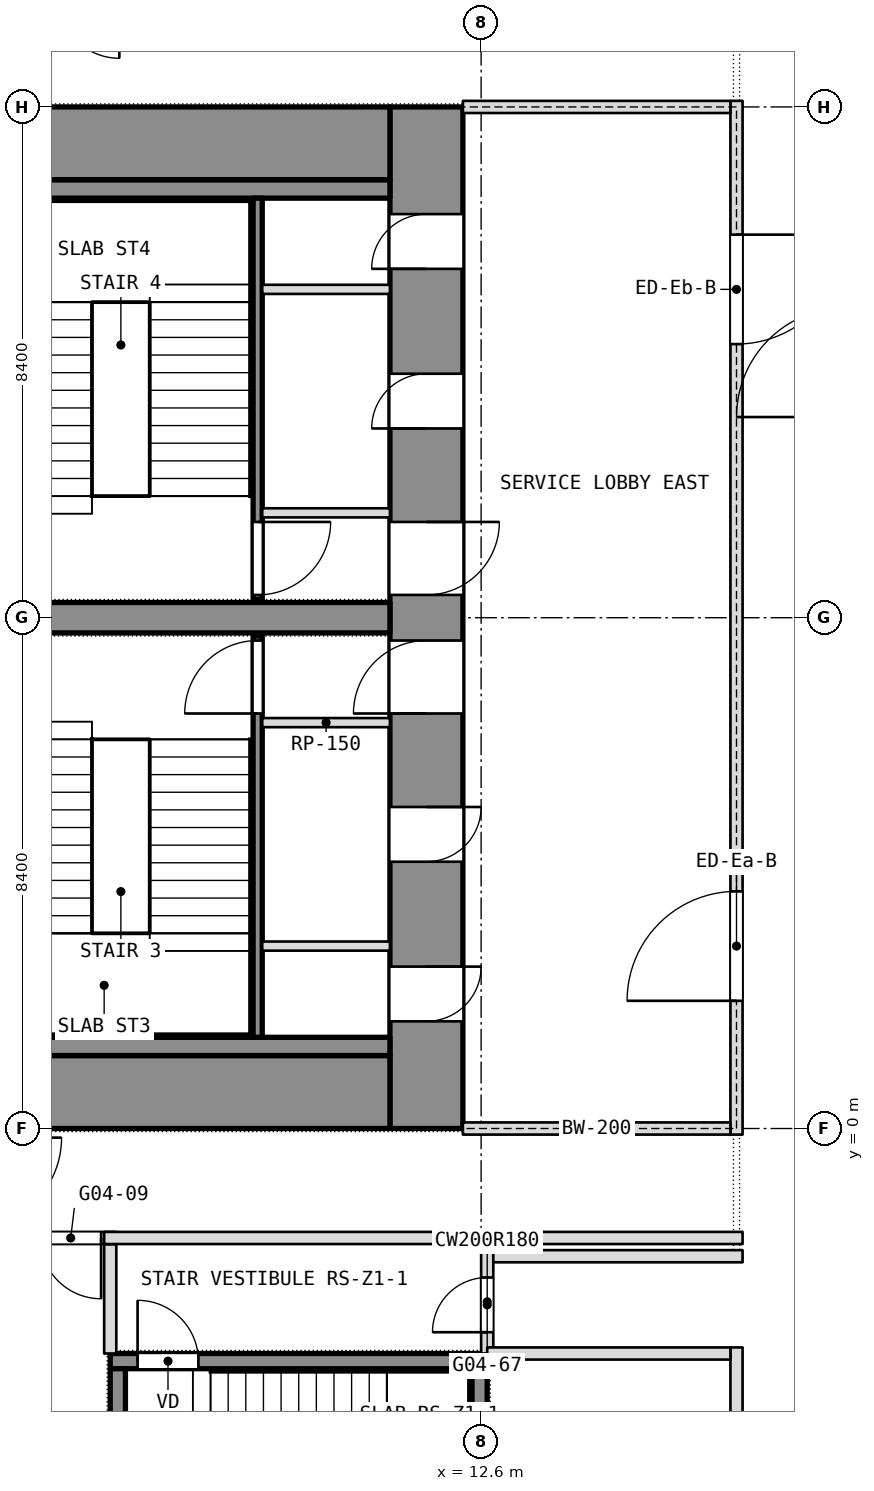
"""IFC4 building model, lengths in metres.
Left out: names, types, materials, properties, quantities, classifications, styles, units other than length and angle.
Written with IfcOpenShell. Run it as: python <this file> out.ifc"""

import sys

from ifc_helpers import new_model, si_unit, direction, frame, frame_2d, origin, place, context, subcontext, project, spatial, rectangle, extrude, element, fill, save


model = new_model("IFC4")
c1 = context("Model", 3, precision=1e-05, world=origin(), true_north=direction((0.0, 1.0)))
c2 = subcontext(c1, "Body", "Model", "MODEL_VIEW")
j1 = project(units=[si_unit("LENGTHUNIT", "METRE"), si_unit("PLANEANGLEUNIT", "RADIAN")], contexts=[c1])
p1 = place(None, origin())
s1 = spatial("IfcSite", under=j1, at=p1, CompositionType="ELEMENT")
p2 = place(p1, origin())
s2 = spatial("IfcBuilding", under=s1, at=p2, CompositionType="ELEMENT")
p3 = place(p2, frame((0.0, 0.0, 58.1)))
s3 = spatial("IfcBuildingStorey", under=s2, at=p3, CompositionType="ELEMENT", Elevation=58.1)
p4 = place(p3, frame((11.7, 0.0, 0.0), z_axis=(0.0, 0.0, 1.0), x_axis=(0.0, 1.0, 0.0)))
e1 = element("IfcWall", 1, at=p4, inside=s3, PredefinedType="SHEAR", context=c2, shape_type="SweptSolid", body=[
    extrude(rectangle(XDim=16.8, YDim=1.2, at=frame_2d((8.4, 0.0))), origin(), (0.0, 0.0, 1.0), 3.6),
])
p5 = place(p4, frame((1.762, 0.0, 0.0)))
e2 = element("IfcOpeningElement", 2, at=p5, cuts=e1, PredefinedType="OPENING", context=c2, shape_type="SweptSolid", body=[
    extrude(rectangle(XDim=0.9, YDim=2.1, at=frame_2d((0.45, 1.05))), frame((0.0, 0.6, 0.0), z_axis=(0.0, -1.0, 0.0), x_axis=(1.0, 0.0, 0.0)), (0.0, 0.0, 1.0), 1.2),
])
p6 = place(p4, frame((4.387, 0.0, 0.0)))
e3 = element("IfcOpeningElement", 3, at=p6, cuts=e1, PredefinedType="OPENING", context=c2, shape_type="SweptSolid", body=[
    extrude(rectangle(XDim=0.9, YDim=2.1, at=frame_2d((0.45, 1.05))), frame((0.0, 0.6, 0.0), z_axis=(0.0, -1.0, 0.0), x_axis=(1.0, 0.0, 0.0)), (0.0, 0.0, 1.0), 1.2),
])
p7 = place(p4, frame((6.825, 0.0, 0.0)))
e4 = element("IfcOpeningElement", 4, at=p7, cuts=e1, PredefinedType="OPENING", context=c2, shape_type="SweptSolid", body=[
    extrude(rectangle(XDim=1.2, YDim=2.1, at=frame_2d((0.6, 1.05))), frame((0.0, 0.6, 0.0), z_axis=(0.0, -1.0, 0.0), x_axis=(1.0, 0.0, 0.0)), (0.0, 0.0, 1.0), 1.2),
])
p8 = place(p4, frame((14.137, 0.0, 0.0)))
e5 = element("IfcOpeningElement", 5, at=p8, cuts=e1, PredefinedType="OPENING", context=c2, shape_type="SweptSolid", body=[
    extrude(rectangle(XDim=0.9, YDim=2.1, at=frame_2d((0.45, 1.05))), frame((0.0, 0.6, 0.0), z_axis=(0.0, -1.0, 0.0), x_axis=(1.0, 0.0, 0.0)), (0.0, 0.0, 1.0), 1.2),
])
p9 = place(p4, frame((11.512, 0.0, 0.0)))
e6 = element("IfcOpeningElement", 6, at=p9, cuts=e1, PredefinedType="OPENING", context=c2, shape_type="SweptSolid", body=[
    extrude(rectangle(XDim=0.9, YDim=2.1, at=frame_2d((0.45, 1.05))), frame((0.0, 0.6, 0.0), z_axis=(0.0, -1.0, 0.0), x_axis=(1.0, 0.0, 0.0)), (0.0, 0.0, 1.0), 1.2),
])
p10 = place(p4, frame((8.775, 0.0, 0.0)))
e7 = element("IfcOpeningElement", 7, at=p10, cuts=e1, PredefinedType="OPENING", context=c2, shape_type="SweptSolid", body=[
    extrude(rectangle(XDim=1.2, YDim=2.1, at=frame_2d((0.6, 1.05))), frame((0.0, 0.6, 0.0), z_axis=(0.0, -1.0, 0.0), x_axis=(1.0, 0.0, 0.0)), (0.0, 0.0, 1.0), 1.2),
])
for number, where, z_axis, x_axis in (
    (8, (-11.1, 0.6, 0.0), (0.0, 0.0, 1.0), (1.0, 0.0, 0.0)),
    (9, (-11.1, 16.2, 0.0), (0.0, 0.0, 1.0), (1.0, 0.0, 0.0)),
):
    element("IfcWall", number, at=place(p3, frame(where, z_axis=z_axis, x_axis=x_axis)), inside=s3, PredefinedType="SHEAR", context=c2, shape_type="SweptSolid", body=[
        extrude(rectangle(XDim=22.2, YDim=1.2, at=frame_2d((11.1, 0.0))), origin(), (0.0, 0.0, 1.0), 3.6),
    ])
p11 = place(p3, frame((4.45, 8.4, 0.0), z_axis=(0.0, 0.0, 1.0), x_axis=(1.0, 0.0, 0.0)))
e10 = element("IfcWall", 10, at=p11, inside=s3, PredefinedType="SHEAR", context=c2, shape_type="SweptSolid", body=[
    extrude(rectangle(XDim=6.65, YDim=0.5, at=frame_2d((3.325, 0.0))), origin(), (0.0, 0.0, 1.0), 3.6),
])
p12 = place(p3, frame((16.8, -10.9, 0.0), z_axis=(0.0, 0.0, 1.0), x_axis=(0.0, 1.0, 0.0)))
e11 = element("IfcWall", 11, at=p12, inside=s3, PredefinedType="PARTITIONING", context=c2, shape_type="SweptSolid", body=[
    extrude(rectangle(XDim=7.3, YDim=0.2, at=frame_2d((3.65, 0.0))), origin(), (0.0, 0.0, 1.0), 3.34),
])
p13 = place(p12, frame((3.15, 0.0, 0.0)))
e12 = element("IfcOpeningElement", 12, at=p13, cuts=e11, PredefinedType="OPENING", context=c2, shape_type="SweptSolid", body=[
    extrude(rectangle(XDim=1.0, YDim=2.1, at=frame_2d((0.5, 1.05))), frame((0.0, 0.1, 0.0), z_axis=(0.0, -1.0, 0.0), x_axis=(1.0, 0.0, 0.0)), (0.0, 0.0, 1.0), 0.2),
])
p14 = place(p3, frame((12.7, -3.7, 0.0), z_axis=(0.0, 0.0, 1.0), x_axis=(0.0, 1.0, 0.0)))
e13 = element("IfcWall", 13, at=p14, inside=s3, PredefinedType="PARTITIONING", context=c2, shape_type="SweptSolid", body=[
    extrude(rectangle(XDim=1.7, YDim=0.2, at=frame_2d((0.85, 0.0))), origin(), (0.0, 0.0, 1.0), 3.34),
])
p15 = place(p14, frame((0.35, 0.0, 0.0)))
e14 = element("IfcOpeningElement", 14, at=p15, cuts=e13, PredefinedType="OPENING", context=c2, shape_type="SweptSolid", body=[
    extrude(rectangle(XDim=0.9, YDim=2.1, at=frame_2d((0.45, 1.05))), frame((0.0, 0.1, 0.0), z_axis=(0.0, -1.0, 0.0), x_axis=(1.0, 0.0, 0.0)), (0.0, 0.0, 1.0), 0.2),
])
p16 = place(p3, frame((6.5, -3.7, 0.0), z_axis=(0.0, 0.0, 1.0), x_axis=(0.0, 1.0, 0.0)))
e15 = element("IfcWall", 15, at=p16, inside=s3, PredefinedType="PARTITIONING", context=c2, shape_type="SweptSolid", body=[
    extrude(rectangle(XDim=1.8, YDim=0.2, at=frame_2d((0.9, 0.0))), origin(), (0.0, 0.0, 1.0), 3.34),
])
p17 = place(p3, frame((12.7, -3.7, 0.0), z_axis=(0.0, 0.0, 1.0), x_axis=(1.0, 0.0, 0.0)))
e16 = element("IfcWall", 16, at=p17, inside=s3, PredefinedType="PARTITIONING", context=c2, shape_type="SweptSolid", body=[
    extrude(rectangle(XDim=4.0, YDim=0.2, at=frame_2d((2.0, 0.0))), origin(), (0.0, 0.0, 1.0), 3.34),
])
p18 = place(p3, frame((12.8, -2.1, 0.0), z_axis=(0.0, 0.0, 1.0), x_axis=(1.0, 0.0, 0.0)))
e17 = element("IfcWall", 17, at=p18, inside=s3, PredefinedType="PARTITIONING", context=c2, shape_type="SweptSolid", body=[
    extrude(rectangle(XDim=4.1, YDim=0.2, at=frame_2d((2.05, 0.0))), origin(), (0.0, 0.0, 1.0), 3.34),
])
p19 = place(p3, frame((-5.6, -1.8, 0.0), z_axis=(0.0, 0.0, 1.0), x_axis=(1.0, 0.0, 0.0)))
e18 = element("IfcWall", 18, at=p19, inside=s3, PredefinedType="PARTITIONING", context=c2, shape_type="SweptSolid", body=[
    extrude(rectangle(XDim=12.2, YDim=0.2, at=frame_2d((6.1, 0.0))), origin(), (0.0, 0.0, 1.0), 3.34),
])
p20 = place(p19, frame((0.25, 0.0, 0.0)))
e19 = element("IfcOpeningElement", 19, at=p20, cuts=e18, PredefinedType="OPENING", context=c2, shape_type="SweptSolid", body=[
    extrude(rectangle(XDim=1.0, YDim=2.1, at=frame_2d((0.5, 1.05))), frame((0.0, 0.1, 0.0), z_axis=(0.0, -1.0, 0.0), x_axis=(1.0, 0.0, 0.0)), (0.0, 0.0, 1.0), 0.2),
])
p21 = place(p19, frame((3.0, 0.0, 0.0)))
e20 = element("IfcOpeningElement", 20, at=p21, cuts=e18, PredefinedType="OPENING", context=c2, shape_type="SweptSolid", body=[
    extrude(rectangle(XDim=1.0, YDim=2.1, at=frame_2d((0.5, 1.05))), frame((0.0, 0.1, 0.0), z_axis=(0.0, -1.0, 0.0), x_axis=(1.0, 0.0, 0.0)), (0.0, 0.0, 1.0), 0.2),
])
p22 = place(p19, frame((10.95, 0.0, 0.0)))
e21 = element("IfcOpeningElement", 21, at=p22, cuts=e18, PredefinedType="OPENING", context=c2, shape_type="SweptSolid", body=[
    extrude(rectangle(XDim=1.0, YDim=2.1, at=frame_2d((0.5, 1.05))), frame((0.0, 0.1, 0.0), z_axis=(0.0, -1.0, 0.0), x_axis=(1.0, 0.0, 0.0)), (0.0, 0.0, 1.0), 0.2),
])
p23 = place(p19, frame((7.2, 0.0, 0.0)))
e22 = element("IfcOpeningElement", 22, at=p23, cuts=e18, PredefinedType="OPENING", context=c2, shape_type="SweptSolid", body=[
    extrude(rectangle(XDim=1.0, YDim=2.1, at=frame_2d((0.5, 1.05))), frame((0.0, 0.1, 0.0), z_axis=(0.0, -1.0, 0.0), x_axis=(1.0, 0.0, 0.0)), (0.0, 0.0, 1.0), 0.2),
])
p24 = place(p3, frame((6.4, -1.8, 0.0), z_axis=(0.0, 0.0, 1.0), x_axis=(1.0, 0.0, 0.0)))
e23 = element("IfcWall", 23, at=p24, inside=s3, PredefinedType="PARTITIONING", context=c2, shape_type="SweptSolid", body=[
    extrude(rectangle(XDim=10.5, YDim=0.2, at=frame_2d((5.25, 0.0))), origin(), (0.0, 0.0, 1.0), 3.34),
])
for number, where, z_axis, x_axis in (
    (24, (-11.1, 1.35, 0.0), (0.0, 0.0, 1.0), (1.0, 0.0, 0.0)),
    (25, (-11.1, 15.45, 0.0), (0.0, 0.0, 1.0), (1.0, 0.0, 0.0)),
):
    element("IfcWall", number, at=place(p3, frame(where, z_axis=z_axis, x_axis=x_axis)), inside=s3, PredefinedType="PARTITIONING", context=c2, shape_type="SweptSolid", body=[
        extrude(rectangle(XDim=22.2, YDim=0.3, at=frame_2d((11.1, 0.0))), origin(), (0.0, 0.0, 1.0), 3.34),
    ])
p25 = place(p3, frame((8.925, 1.5, 0.0), z_axis=(0.0, 0.0, 1.0), x_axis=(0.0, 1.0, 0.0)))
e26 = element("IfcWall", 26, at=p25, inside=s3, PredefinedType="SHEAR", context=c2, shape_type="SweptSolid", body=[
    extrude(rectangle(XDim=6.6, YDim=0.15, at=frame_2d((3.3, 0.0))), origin(), (0.0, 0.0, 1.0), 3.34),
])
p26 = place(p25, frame((5.325, 0.0, 0.0)))
e27 = element("IfcOpeningElement", 27, at=p26, cuts=e26, PredefinedType="OPENING", context=c2, shape_type="SweptSolid", body=[
    extrude(rectangle(XDim=1.2, YDim=2.1, at=frame_2d((0.6, 1.05))), frame((0.0, 0.075, 0.0), z_axis=(0.0, -1.0, 0.0), x_axis=(1.0, 0.0, 0.0)), (0.0, 0.0, 1.0), 0.15),
])
for number, where, z_axis, x_axis in (
    (28, (9.0, 6.675, 0.0), (0.0, 0.0, 1.0), (1.0, 0.0, 0.0)),
    (29, (9.0, 3.0, 0.0), (0.0, 0.0, 1.0), (1.0, 0.0, 0.0)),
):
    element("IfcWall", number, at=place(p3, frame(where, z_axis=z_axis, x_axis=x_axis)), inside=s3, PredefinedType="PARTITIONING", context=c2, shape_type="SweptSolid", body=[
        extrude(rectangle(XDim=2.1, YDim=0.15, at=frame_2d((1.05, 0.0))), origin(), (0.0, 0.0, 1.0), 3.34),
    ])
p27 = place(p3, frame((8.925, 8.7, 0.0), z_axis=(0.0, 0.0, 1.0), x_axis=(0.0, 1.0, 0.0)))
e30 = element("IfcWall", 30, at=p27, inside=s3, PredefinedType="SHEAR", context=c2, shape_type="SweptSolid", body=[
    extrude(rectangle(XDim=6.6, YDim=0.15, at=frame_2d((3.3, 0.0))), origin(), (0.0, 0.0, 1.0), 3.34),
])
p28 = place(p27, frame((0.075, 0.0, 0.0)))
e31 = element("IfcOpeningElement", 31, at=p28, cuts=e30, PredefinedType="OPENING", context=c2, shape_type="SweptSolid", body=[
    extrude(rectangle(XDim=1.2, YDim=2.1, at=frame_2d((0.6, 1.05))), frame((0.0, 0.075, 0.0), z_axis=(0.0, -1.0, 0.0), x_axis=(1.0, 0.0, 0.0)), (0.0, 0.0, 1.0), 0.15),
])
for number, where, z_axis, x_axis in (
    (32, (9.0, 10.125, 0.0), (0.0, 0.0, 1.0), (1.0, 0.0, 0.0)),
    (33, (9.0, 13.8, 0.0), (0.0, 0.0, 1.0), (1.0, 0.0, 0.0)),
):
    element("IfcWall", number, at=place(p3, frame(where, z_axis=z_axis, x_axis=x_axis)), inside=s3, PredefinedType="PARTITIONING", context=c2, shape_type="SweptSolid", body=[
        extrude(rectangle(XDim=2.1, YDim=0.15, at=frame_2d((1.05, 0.0))), origin(), (0.0, 0.0, 1.0), 3.34),
    ])
p29 = place(p3, frame((16.8, -0.1, 0.0), z_axis=(0.0, 0.0, 1.0), x_axis=(0.0, 1.0, 0.0)))
e34 = element("IfcWall", 34, at=p29, inside=s3, PredefinedType="PARTITIONING", context=c2, shape_type="SweptSolid", body=[
    extrude(rectangle(XDim=17.0, YDim=0.2, at=frame_2d((8.5, 0.0))), origin(), (0.0, 0.0, 1.0), 3.34),
])
p30 = place(p29, frame((2.2, 0.0, 0.0)))
e35 = element("IfcOpeningElement", 35, at=p30, cuts=e34, PredefinedType="OPENING", context=c2, shape_type="SweptSolid", body=[
    extrude(rectangle(XDim=1.8, YDim=2.1, at=frame_2d((0.9, 1.05))), frame((0.0, 0.1, 0.0), z_axis=(0.0, -1.0, 0.0), x_axis=(1.0, 0.0, 0.0)), (0.0, 0.0, 1.0), 0.2),
])
p31 = place(p29, frame((13.0, 0.0, 0.0)))
e36 = element("IfcOpeningElement", 36, at=p31, cuts=e34, PredefinedType="OPENING", context=c2, shape_type="SweptSolid", body=[
    extrude(rectangle(XDim=1.8, YDim=2.1, at=frame_2d((0.9, 1.05))), frame((0.0, 0.1, 0.0), z_axis=(0.0, -1.0, 0.0), x_axis=(1.0, 0.0, 0.0)), (0.0, 0.0, 1.0), 0.2),
])
for number, where, z_axis, x_axis in (
    (37, (12.3, 0.0, 0.0), (0.0, 0.0, 1.0), (1.0, 0.0, 0.0)),
    (38, (12.3, 16.8, 0.0), (0.0, 0.0, 1.0), (1.0, 0.0, 0.0)),
):
    element("IfcWall", number, at=place(p3, frame(where, z_axis=z_axis, x_axis=x_axis)), inside=s3, PredefinedType="PARTITIONING", context=c2, shape_type="SweptSolid", body=[
        extrude(rectangle(XDim=4.4, YDim=0.2, at=frame_2d((2.2, 0.0))), origin(), (0.0, 0.0, 1.0), 2.84),
    ])
p32 = place(p3, frame((6.5, -3.825, 0.1), z_axis=(0.0, 0.0, 1.0), x_axis=(1.0, 0.0, 0.0)))
e39 = element("IfcWall", 39, at=p32, inside=s3, PredefinedType="SHEAR", context=c2, shape_type="SweptSolid", body=[
    extrude(rectangle(XDim=6.2, YDim=0.25, at=frame_2d((3.1, 0.0))), origin(), (0.0, 0.0, 1.0), 3.6),
])
p33 = place(p32, frame((0.45, 0.0, 0.0)))
e40 = element("IfcOpeningElement", 40, at=p33, cuts=e39, PredefinedType="OPENING", context=c2, shape_type="SweptSolid", body=[
    extrude(rectangle(XDim=1.0, YDim=2.1, at=frame_2d((0.5, 1.05))), frame((0.0, 0.125, 0.0), z_axis=(0.0, -1.0, 0.0), x_axis=(1.0, 0.0, 0.0)), (0.0, 0.0, 1.0), 0.25),
])
for number, where, z_axis, x_axis in (
    (41, (6.625, -6.85, 0.1), (0.0, 0.0, 1.0), (0.0, 1.0, 0.0)),
    (42, (12.575, -6.85, 0.1), (0.0, 0.0, 1.0), (0.0, 1.0, 0.0)),
):
    element("IfcWall", number, at=place(p3, frame(where, z_axis=z_axis, x_axis=x_axis)), inside=s3, PredefinedType="SHEAR", context=c2, shape_type="SweptSolid", body=[
        extrude(rectangle(XDim=2.9, YDim=0.25, at=frame_2d((1.45, 0.0))), origin(), (0.0, 0.0, 1.0), 3.6),
    ])
p34 = place(p15, origin())
e43 = element("IfcDoor", 43, at=p34, inside=s3, OperationType="SINGLE_SWING_RIGHT", PredefinedType="DOOR", context=c2, shape_type="SweptSolid", body=[
    extrude(rectangle(XDim=0.9, YDim=2.1, at=frame_2d((0.45, 1.05))), frame((0.0, 0.025, 0.0), z_axis=(0.0, -1.0, 0.0), x_axis=(1.0, 0.0, 0.0)), (0.0, 0.0, 1.0), 0.05),
])
fill(e14, e43)
p35 = place(p22, origin())
e44 = element("IfcDoor", 44, at=p35, inside=s3, OperationType="SINGLE_SWING_RIGHT", PredefinedType="DOOR", context=c2, shape_type="SweptSolid", body=[
    extrude(rectangle(XDim=1.0, YDim=2.1, at=frame_2d((0.5, 1.05))), frame((0.0, 0.025, 0.0), z_axis=(0.0, -1.0, 0.0), x_axis=(1.0, 0.0, 0.0)), (0.0, 0.0, 1.0), 0.05),
])
fill(e21, e44)
p36 = place(p33, origin())
e45 = element("IfcDoor", 45, at=p36, inside=s3, OperationType="SINGLE_SWING_LEFT", PredefinedType="DOOR", context=c2, shape_type="SweptSolid", body=[
    extrude(rectangle(XDim=1.0, YDim=2.1, at=frame_2d((0.5, 1.05))), frame((0.0, 0.025, 0.0), z_axis=(0.0, -1.0, 0.0), x_axis=(1.0, 0.0, 0.0)), (0.0, 0.0, 1.0), 0.05),
])
fill(e40, e45)
p37 = place(p5, origin())
e46 = element("IfcDoor", 46, at=p37, inside=s3, OperationType="SINGLE_SWING_LEFT", PredefinedType="DOOR", context=c2, shape_type="SweptSolid", body=[
    extrude(rectangle(XDim=0.9, YDim=2.1, at=frame_2d((0.45, 1.05))), frame((0.0, 0.025, 0.0), z_axis=(0.0, -1.0, 0.0), x_axis=(1.0, 0.0, 0.0)), (0.0, 0.0, 1.0), 0.05),
])
fill(e2, e46)
p38 = place(p6, origin())
e47 = element("IfcDoor", 47, at=p38, inside=s3, OperationType="SINGLE_SWING_LEFT", PredefinedType="DOOR", context=c2, shape_type="SweptSolid", body=[
    extrude(rectangle(XDim=0.9, YDim=2.1, at=frame_2d((0.45, 1.05))), frame((0.0, 0.025, 0.0), z_axis=(0.0, -1.0, 0.0), x_axis=(1.0, 0.0, 0.0)), (0.0, 0.0, 1.0), 0.05),
])
fill(e3, e47)
p39 = place(p7, origin())
e48 = element("IfcDoor", 48, at=p39, inside=s3, OperationType="SINGLE_SWING_LEFT", PredefinedType="DOOR", context=c2, shape_type="SweptSolid", body=[
    extrude(rectangle(XDim=1.2, YDim=2.1, at=frame_2d((0.6, 1.05))), frame((0.0, 0.025, 0.0), z_axis=(0.0, -1.0, 0.0), x_axis=(1.0, 0.0, 0.0)), (0.0, 0.0, 1.0), 0.05),
])
fill(e4, e48)
p40 = place(p26, origin())
e49 = element("IfcDoor", 49, at=p40, inside=s3, OperationType="SINGLE_SWING_LEFT", PredefinedType="DOOR", context=c2, shape_type="SweptSolid", body=[
    extrude(rectangle(XDim=1.2, YDim=2.1, at=frame_2d((0.6, 1.05))), frame((0.0, 0.025, 0.0), z_axis=(0.0, -1.0, 0.0), x_axis=(1.0, 0.0, 0.0)), (0.0, 0.0, 1.0), 0.05),
])
fill(e27, e49)
p41 = place(p8, origin())
e50 = element("IfcDoor", 50, at=p41, inside=s3, OperationType="SINGLE_SWING_LEFT", PredefinedType="DOOR", context=c2, shape_type="SweptSolid", body=[
    extrude(rectangle(XDim=0.9, YDim=2.1, at=frame_2d((0.45, 1.05))), frame((0.0, 0.025, 0.0), z_axis=(0.0, -1.0, 0.0), x_axis=(1.0, 0.0, 0.0)), (0.0, 0.0, 1.0), 0.05),
])
fill(e5, e50)
p42 = place(p9, origin())
e51 = element("IfcDoor", 51, at=p42, inside=s3, OperationType="SINGLE_SWING_LEFT", PredefinedType="DOOR", context=c2, shape_type="SweptSolid", body=[
    extrude(rectangle(XDim=0.9, YDim=2.1, at=frame_2d((0.45, 1.05))), frame((0.0, 0.025, 0.0), z_axis=(0.0, -1.0, 0.0), x_axis=(1.0, 0.0, 0.0)), (0.0, 0.0, 1.0), 0.05),
])
fill(e6, e51)
p43 = place(p10, origin())
e52 = element("IfcDoor", 52, at=p43, inside=s3, OperationType="SINGLE_SWING_LEFT", PredefinedType="DOOR", context=c2, shape_type="SweptSolid", body=[
    extrude(rectangle(XDim=1.2, YDim=2.1, at=frame_2d((0.6, 1.05))), frame((0.0, 0.025, 0.0), z_axis=(0.0, -1.0, 0.0), x_axis=(1.0, 0.0, 0.0)), (0.0, 0.0, 1.0), 0.05),
])
fill(e7, e52)
p44 = place(p28, origin())
e53 = element("IfcDoor", 53, at=p44, inside=s3, OperationType="SINGLE_SWING_LEFT", PredefinedType="DOOR", context=c2, shape_type="SweptSolid", body=[
    extrude(rectangle(XDim=1.2, YDim=2.1, at=frame_2d((0.6, 1.05))), frame((0.0, 0.025, 0.0), z_axis=(0.0, -1.0, 0.0), x_axis=(1.0, 0.0, 0.0)), (0.0, 0.0, 1.0), 0.05),
])
fill(e31, e53)
p45 = place(p30, origin())
e54 = element("IfcDoor", 54, at=p45, inside=s3, OperationType="DOUBLE_DOOR_SINGLE_SWING", PredefinedType="DOOR", context=c2, shape_type="SweptSolid", body=[
    extrude(rectangle(XDim=1.8, YDim=2.1, at=frame_2d((0.9, 1.05))), frame((0.0, 0.025, 0.0), z_axis=(0.0, -1.0, 0.0), x_axis=(1.0, 0.0, 0.0)), (0.0, 0.0, 1.0), 0.05),
])
fill(e35, e54)
p46 = place(p31, origin())
e55 = element("IfcDoor", 55, at=p46, inside=s3, OperationType="DOUBLE_DOOR_SINGLE_SWING", PredefinedType="DOOR", context=c2, shape_type="SweptSolid", body=[
    extrude(rectangle(XDim=1.8, YDim=2.1, at=frame_2d((0.9, 1.05))), frame((0.0, 0.025, 0.0), z_axis=(0.0, -1.0, 0.0), x_axis=(1.0, 0.0, 0.0)), (0.0, 0.0, 1.0), 0.05),
])
fill(e36, e55)
save(model, sys.argv[1])
